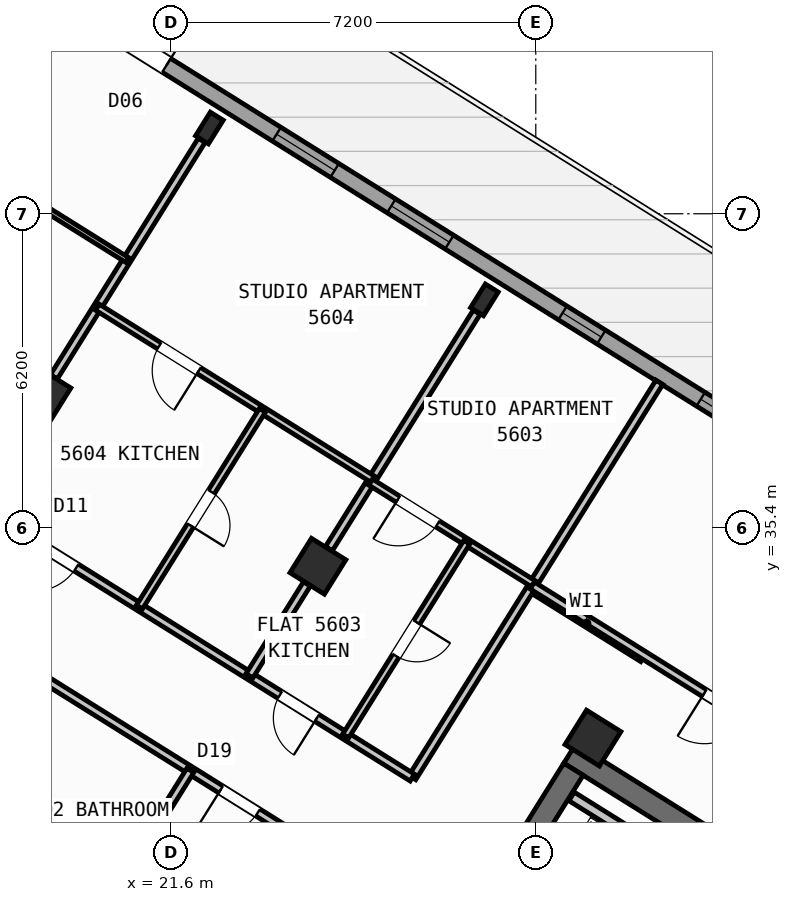
"""IFC4 building model, lengths in metres.
Left out: names, types, materials, properties, quantities, classifications, styles, units other than length and angle.
Written with IfcOpenShell. Run it as: python <this file> out.ifc"""

import sys

from ifc_helpers import new_model, si_unit, direction, frame, frame_2d, origin, origin_2d, place, context, subcontext, project, spatial, rectangle, hollow_rectangle, i_section, extrude, source, transform, mapped, element, fill, save


model = new_model("IFC4")
c1 = context("Model", 3, precision=1e-05, world=origin(), true_north=direction((0.0, 1.0)))
c2 = subcontext(c1, "Body", "Model", "MODEL_VIEW")
j1 = project(units=[si_unit("LENGTHUNIT", "METRE"), si_unit("PLANEANGLEUNIT", "RADIAN")], contexts=[c1])
p1 = place(None, origin())
s1 = spatial("IfcSite", under=j1, at=p1, CompositionType="ELEMENT")
p2 = place(p1, origin())
s2 = spatial("IfcBuilding", under=s1, at=p2, CompositionType="ELEMENT")
p3 = place(p2, frame((0.0, 0.0, 222.0)))
s3 = spatial("IfcBuildingStorey", under=s2, at=p3, CompositionType="ELEMENT", Elevation=222.0)
p4 = place(p3, frame((40.531, 24.036, 0.0), z_axis=(0.0, 0.0, 1.0), x_axis=(-0.848048787466, 0.529918157905, 0.0)))
e1 = element("IfcWall", 1, at=p4, inside=s3, PredefinedType="SHEAR", context=c2, shape_type="SweptSolid", body=[
    extrude(rectangle(XDim=13.04, YDim=0.45, at=frame_2d((6.52, 0.0))), origin(), (0.0, 0.0, 1.0), 3.35),
])
p5 = place(p3, frame((29.544, 30.636, 0.0), z_axis=(0.0, 0.0, 1.0), x_axis=(-0.529902075036, -0.848058836916, 0.0)))
e2 = element("IfcWall", 2, at=p5, inside=s3, PredefinedType="SHEAR", context=c2, shape_type="SweptSolid", body=[
    extrude(rectangle(XDim=3.625, YDim=0.45, at=frame_2d((1.812, 0.0))), origin(), (0.0, 0.0, 1.0), 3.35),
])
m1 = source(origin(), c2, "Body", "SweptSolid", [
    extrude(hollow_rectangle(XDim=0.8, YDim=0.8, WallThickness=0.032, at=origin_2d()), origin(), (0.0, 0.0, 1.0), 3.6),
])
p6 = place(p3, frame((29.928, 31.251, 0.0), z_axis=(0.0, 0.0, 1.0), x_axis=(-0.848048096156, 0.529919264233, 0.0)))
e3 = element("IfcColumn", 3, at=p6, inside=s3, PredefinedType="COLUMN", context=c2, shape_type="MappedRepresentation", body=[
    mapped(m1, transform((0.0, 0.0, 0.0), scale=1.0)),
])
m2 = source(origin(), c2, "Body", "SweptSolid", [
    extrude(i_section(OverallWidth=0.3, OverallDepth=0.55, WebThickness=0.015, FlangeThickness=0.029, at=origin_2d()), origin(), (0.0, 0.0, 1.0), 3.6),
])
p7 = place(p3, frame((27.786, 39.901, 0.0), z_axis=(0.0, 0.0, 1.0), x_axis=(-0.848048096156, 0.529919264233, 0.0)))
e4 = element("IfcColumn", 4, at=p7, inside=s3, PredefinedType="COLUMN", context=c2, shape_type="MappedRepresentation", body=[
    mapped(m2, transform((0.0, 0.0, 0.0), scale=1.0)),
])
p8 = place(p3, frame((24.5, 34.643, 0.0), z_axis=(0.0, 0.0, 1.0), x_axis=(-0.848048096156, 0.529919264233, 0.0)))
e5 = element("IfcColumn", 5, at=p8, inside=s3, PredefinedType="COLUMN", context=c2, shape_type="MappedRepresentation", body=[
    mapped(m1, transform((0.0, 0.0, 0.0), scale=1.0)),
])
p9 = place(p3, frame((22.358, 43.292, 0.0), z_axis=(0.0, 0.0, 1.0), x_axis=(-0.848048096156, 0.529919264233, 0.0)))
e6 = element("IfcColumn", 6, at=p9, inside=s3, PredefinedType="COLUMN", context=c2, shape_type="MappedRepresentation", body=[
    mapped(m2, transform((0.0, 0.0, 0.0), scale=1.0)),
])
p10 = place(p3, frame((19.073, 38.034, 0.0), z_axis=(0.0, 0.0, 1.0), x_axis=(-0.848048096156, 0.529919264233, 0.0)))
e7 = element("IfcColumn", 7, at=p10, inside=s3, PredefinedType="COLUMN", context=c2, shape_type="MappedRepresentation", body=[
    mapped(m1, transform((0.0, 0.0, 0.0), scale=1.0)),
])
p11 = place(p3, frame((17.424, 47.083, 0.0), z_axis=(0.0, 0.0, 1.0), x_axis=(0.848049927979, -0.529916332693, 0.0)))
e8 = element("IfcWall", 8, at=p11, inside=s3, PredefinedType="STANDARD", context=c2, shape_type="SweptSolid", body=[
    extrude(rectangle(XDim=29.223, YDim=0.32, at=frame_2d((14.612, 0.0))), origin(), (0.0, 0.0, 1.0), 3.35),
])
p12 = place(p11, frame((3.77, 0.0, 0.0)))
e9 = element("IfcOpeningElement", 9, at=p12, cuts=e8, PredefinedType="OPENING", context=c2, shape_type="SweptSolid", body=[
    extrude(rectangle(XDim=1.05, YDim=2.15, at=frame_2d((0.525, 1.075))), frame((0.0, 0.17, 0.0), z_axis=(0.0, -1.0, 0.0), x_axis=(1.0, 0.0, 0.0)), (0.0, 0.0, 1.0), 0.34),
])
p13 = place(p11, frame((1.125, 0.0, 0.9)))
e10 = element("IfcOpeningElement", 10, at=p13, cuts=e8, PredefinedType="OPENING", context=c2, shape_type="SweptSolid", body=[
    extrude(rectangle(XDim=1.65, YDim=1.45, at=frame_2d((0.825, 0.725))), frame((0.0, 0.17, 0.0), z_axis=(0.0, -1.0, 0.0), x_axis=(1.0, 0.0, 0.0)), (0.0, 0.0, 1.0), 0.34),
])
p14 = place(p11, frame((7.384, 0.0, 0.9)))
e11 = element("IfcOpeningElement", 11, at=p14, cuts=e8, PredefinedType="OPENING", context=c2, shape_type="SweptSolid", body=[
    extrude(rectangle(XDim=1.35, YDim=1.45, at=frame_2d((0.675, 0.725))), frame((0.0, 0.17, 0.0), z_axis=(0.0, -1.0, 0.0), x_axis=(1.0, 0.0, 0.0)), (0.0, 0.0, 1.0), 0.34),
])
p15 = place(p11, frame((10.054, 0.0, 0.9)))
e12 = element("IfcOpeningElement", 12, at=p15, cuts=e8, PredefinedType="OPENING", context=c2, shape_type="SweptSolid", body=[
    extrude(rectangle(XDim=1.35, YDim=1.45, at=frame_2d((0.675, 0.725))), frame((0.0, 0.17, 0.0), z_axis=(0.0, -1.0, 0.0), x_axis=(1.0, 0.0, 0.0)), (0.0, 0.0, 1.0), 0.34),
])
p16 = place(p11, frame((14.039, 0.0, 1.0)))
e13 = element("IfcOpeningElement", 13, at=p16, cuts=e8, PredefinedType="OPENING", context=c2, shape_type="SweptSolid", body=[
    extrude(rectangle(XDim=0.9, YDim=1.25, at=frame_2d((0.45, 0.625))), frame((0.0, 0.17, 0.0), z_axis=(0.0, -1.0, 0.0), x_axis=(1.0, 0.0, 0.0)), (0.0, 0.0, 1.0), 0.34),
])
p17 = place(p11, frame((17.254, 0.0, 1.0)))
e14 = element("IfcOpeningElement", 14, at=p17, cuts=e8, PredefinedType="OPENING", context=c2, shape_type="SweptSolid", body=[
    extrude(rectangle(XDim=0.9, YDim=1.25, at=frame_2d((0.45, 0.625))), frame((0.0, 0.17, 0.0), z_axis=(0.0, -1.0, 0.0), x_axis=(1.0, 0.0, 0.0)), (0.0, 0.0, 1.0), 0.34),
])
p18 = place(p11, frame((20.161, 0.0, 0.9)))
e15 = element("IfcOpeningElement", 15, at=p18, cuts=e8, PredefinedType="OPENING", context=c2, shape_type="SweptSolid", body=[
    extrude(rectangle(XDim=1.35, YDim=1.45, at=frame_2d((0.675, 0.725))), frame((0.0, 0.17, 0.0), z_axis=(0.0, -1.0, 0.0), x_axis=(1.0, 0.0, 0.0)), (0.0, 0.0, 1.0), 0.34),
])
p19 = place(p11, frame((22.846, 0.0, 0.9)))
e16 = element("IfcOpeningElement", 16, at=p19, cuts=e8, PredefinedType="OPENING", context=c2, shape_type="SweptSolid", body=[
    extrude(rectangle(XDim=1.35, YDim=1.45, at=frame_2d((0.675, 0.725))), frame((0.0, 0.17, 0.0), z_axis=(0.0, -1.0, 0.0), x_axis=(1.0, 0.0, 0.0)), (0.0, 0.0, 1.0), 0.34),
])
p20 = place(p11, frame((26.898, 0.0, 1.0)))
e17 = element("IfcOpeningElement", 17, at=p20, cuts=e8, PredefinedType="OPENING", context=c2, shape_type="SweptSolid", body=[
    extrude(rectangle(XDim=0.9, YDim=1.25, at=frame_2d((0.45, 0.625))), frame((0.0, 0.17, 0.0), z_axis=(0.0, -1.0, 0.0), x_axis=(1.0, 0.0, 0.0)), (0.0, 0.0, 1.0), 0.34),
])
p21 = place(p3, frame((33.363, 27.69, 0.0), z_axis=(0.0, 0.0, 1.0), x_axis=(-0.84804957148, 0.529916903215, 0.0)))
e18 = element("IfcWall", 18, at=p21, inside=s3, PredefinedType="STANDARD", context=c2, shape_type="SweptSolid", body=[
    extrude(rectangle(XDim=4.548, YDim=0.2, at=frame_2d((2.274, 0.0))), origin(), (0.0, 0.0, 1.0), 3.34),
])
p22 = place(p3, frame((30.914, 32.829, 0.0), z_axis=(0.0, 0.0, 1.0), x_axis=(-0.848008813643, 0.529982124211, 0.0)))
e19 = element("IfcWall", 19, at=p22, inside=s3, PredefinedType="PARTITIONING", context=c2, shape_type="SweptSolid", body=[
    extrude(rectangle(XDim=2.61, YDim=0.16, at=frame_2d((1.305, 0.0))), origin(), (0.0, 0.0, 1.0), 3.34),
])
p23 = place(p3, frame((31.239, 38.274, 0.0), z_axis=(0.0, 0.0, 1.0), x_axis=(-0.529920220799, -0.848047498427, 0.0)))
e20 = element("IfcWall", 20, at=p23, inside=s3, PredefinedType="PARTITIONING", context=c2, shape_type="SweptSolid", body=[
    extrude(rectangle(XDim=9.2, YDim=0.16, at=frame_2d((4.6, 0.0))), origin(), (0.0, 0.0, 1.0), 3.34),
])
p24 = place(p3, frame((26.363, 30.472, 0.0), z_axis=(0.0, 0.0, 1.0), x_axis=(-0.848052408131, 0.529912363569, 0.0)))
e21 = element("IfcWall", 21, at=p24, inside=s3, PredefinedType="PARTITIONING", context=c2, shape_type="SweptSolid", body=[
    extrude(rectangle(XDim=16.73, YDim=0.16, at=frame_2d((8.365, 0.0))), origin(), (0.0, 0.0, 1.0), 3.34),
])
p25 = place(p24, frame((2.22, 0.0, 0.0)))
e22 = element("IfcOpeningElement", 22, at=p25, cuts=e21, PredefinedType="OPENING", context=c2, shape_type="SweptSolid", body=[
    extrude(rectangle(XDim=0.86, YDim=2.05, at=frame_2d((0.43, 1.025))), frame((0.0, 0.09, 0.0), z_axis=(0.0, -1.0, 0.0), x_axis=(1.0, 0.0, 0.0)), (0.0, 0.0, 1.0), 0.18),
])
p26 = place(p24, frame((7.82, 0.0, 0.0)))
e23 = element("IfcOpeningElement", 23, at=p26, cuts=e21, PredefinedType="OPENING", context=c2, shape_type="SweptSolid", body=[
    extrude(rectangle(XDim=1.0, YDim=2.1, at=frame_2d((0.5, 1.05))), frame((0.0, 0.09, 0.0), z_axis=(0.0, -1.0, 0.0), x_axis=(1.0, 0.0, 0.0)), (0.0, 0.0, 1.0), 0.18),
])
p27 = place(p24, frame((12.95, 0.0, 0.0)))
e24 = element("IfcOpeningElement", 24, at=p27, cuts=e21, PredefinedType="OPENING", context=c2, shape_type="SweptSolid", body=[
    extrude(rectangle(XDim=1.0, YDim=2.1, at=frame_2d((0.5, 1.05))), frame((0.0, 0.09, 0.0), z_axis=(0.0, -1.0, 0.0), x_axis=(1.0, 0.0, 0.0)), (0.0, 0.0, 1.0), 0.18),
])
p28 = place(p3, frame((25.198, 28.606, 0.0), z_axis=(0.0, 0.0, 1.0), x_axis=(-0.848052408131, 0.529912363569, 0.0)))
e25 = element("IfcWall", 25, at=p28, inside=s3, PredefinedType="PARTITIONING", context=c2, shape_type="SweptSolid", body=[
    extrude(rectangle(XDim=16.73, YDim=0.16, at=frame_2d((8.365, 0.0))), origin(), (0.0, 0.0, 1.0), 3.34),
])
p29 = place(p28, frame((2.22, 0.0, 0.0)))
e26 = element("IfcOpeningElement", 26, at=p29, cuts=e25, PredefinedType="OPENING", context=c2, shape_type="SweptSolid", body=[
    extrude(rectangle(XDim=0.86, YDim=2.05, at=frame_2d((0.43, 1.025))), frame((0.0, 0.09, 0.0), z_axis=(0.0, -1.0, 0.0), x_axis=(1.0, 0.0, 0.0)), (0.0, 0.0, 1.0), 0.18),
])
p30 = place(p28, frame((12.084, 0.0, 0.0)))
e27 = element("IfcOpeningElement", 27, at=p30, cuts=e25, PredefinedType="OPENING", context=c2, shape_type="SweptSolid", body=[
    extrude(rectangle(XDim=1.0, YDim=2.1, at=frame_2d((0.5, 1.05))), frame((0.0, 0.09, 0.0), z_axis=(0.0, -1.0, 0.0), x_axis=(1.0, 0.0, 0.0)), (0.0, 0.0, 1.0), 0.18),
])
p31 = place(p3, frame((21.983, 30.615, 0.0), z_axis=(0.0, 0.0, 1.0), x_axis=(-0.529978410432, -0.848011134641, 0.0)))
e28 = element("IfcWall", 28, at=p31, inside=s3, PredefinedType="PARTITIONING", context=c2, shape_type="SweptSolid", body=[
    extrude(rectangle(XDim=2.138, YDim=0.16, at=frame_2d((1.069, 0.0))), origin(), (0.0, 0.0, 1.0), 2.825),
])
p32 = place(p3, frame((19.556, 26.73, 0.0), z_axis=(0.0, 0.0, 1.0), x_axis=(-0.848043949058, 0.52992590092, 0.0)))
e29 = element("IfcWall", 29, at=p32, inside=s3, PredefinedType="PLUMBINGWALL", context=c2, shape_type="SweptSolid", body=[
    extrude(rectangle(XDim=12.92, YDim=0.14, at=frame_2d((6.46, 0.0))), origin(), (0.0, 0.0, 1.0), 3.34),
])
p33 = place(p32, frame((5.849, 0.0, 0.0)))
e30 = element("IfcOpeningElement", 30, at=p33, cuts=e29, PredefinedType="OPENING", context=c2, shape_type="SweptSolid", body=[
    extrude(rectangle(XDim=0.92, YDim=2.08, at=frame_2d((0.46, 1.04))), frame((0.0, 0.08, 0.0), z_axis=(0.0, -1.0, 0.0), x_axis=(1.0, 0.0, 0.0)), (0.0, 0.0, 1.0), 0.16),
])
p34 = place(p3, frame((27.634, 39.657, 0.0), z_axis=(0.0, 0.0, 1.0), x_axis=(-0.529899205623, -0.848060629837, 0.0)))
e31 = element("IfcWall", 31, at=p34, inside=s3, PredefinedType="PARTITIONING", context=c2, shape_type="SweptSolid", body=[
    extrude(rectangle(XDim=5.501, YDim=0.16, at=frame_2d((2.75, 0.0))), origin(), (0.0, 0.0, 1.0), 2.825),
])
p35 = place(p3, frame((24.282, 34.293, 0.0), z_axis=(0.0, 0.0, 1.0), x_axis=(-0.529927092104, -0.84804320471, 0.0)))
e32 = element("IfcWall", 32, at=p35, inside=s3, PredefinedType="PARTITIONING", context=c2, shape_type="SweptSolid", body=[
    extrude(rectangle(XDim=2.138, YDim=0.16, at=frame_2d((1.069, 0.0))), origin(), (0.0, 0.0, 1.0), 2.825),
])
p36 = place(p3, frame((28.753, 34.297, 0.0), z_axis=(0.0, 0.0, 1.0), x_axis=(-0.848059820872, 0.529900500304, 0.0)))
e33 = element("IfcWall", 33, at=p36, inside=s3, PredefinedType="PLUMBINGWALL", context=c2, shape_type="SweptSolid", body=[
    extrude(rectangle(XDim=3.79, YDim=0.14, at=frame_2d((1.895, 0.0))), origin(), (0.0, 0.0, 1.0), 3.34),
])
p37 = place(p36, frame((2.23, 0.0, 0.0)))
e34 = element("IfcOpeningElement", 34, at=p37, cuts=e33, PredefinedType="OPENING", context=c2, shape_type="SweptSolid", body=[
    extrude(rectangle(XDim=0.92, YDim=2.08, at=frame_2d((0.46, 1.04))), frame((0.0, 0.08, 0.0), z_axis=(0.0, -1.0, 0.0), x_axis=(1.0, 0.0, 0.0)), (0.0, 0.0, 1.0), 0.16),
])
p38 = place(p3, frame((27.439, 35.118, 0.0), z_axis=(0.0, 0.0, 1.0), x_axis=(-0.529911350634, -0.84805304107, 0.0)))
e35 = element("IfcWall", 35, at=p38, inside=s3, PredefinedType="PLUMBINGWALL", context=c2, shape_type="SweptSolid", body=[
    extrude(rectangle(XDim=4.51, YDim=0.14, at=frame_2d((2.255, 0.0))), origin(), (0.0, 0.0, 1.0), 2.995),
])
p39 = place(p38, frame((1.865, 0.0, 0.0)))
e36 = element("IfcOpeningElement", 36, at=p39, cuts=e35, PredefinedType="OPENING", context=c2, shape_type="SweptSolid", body=[
    extrude(rectangle(XDim=0.78, YDim=2.05, at=frame_2d((0.39, 1.025))), frame((0.0, 0.08, 0.0), z_axis=(0.0, -1.0, 0.0), x_axis=(1.0, 0.0, 0.0)), (0.0, 0.0, 1.0), 0.16),
])
p40 = place(p3, frame((22.206, 43.049, 0.0), z_axis=(0.0, 0.0, 1.0), x_axis=(-0.529919150083, -0.848048167486, 0.0)))
e37 = element("IfcWall", 37, at=p40, inside=s3, PredefinedType="PARTITIONING", context=c2, shape_type="SweptSolid", body=[
    extrude(rectangle(XDim=5.501, YDim=0.16, at=frame_2d((2.75, 0.0))), origin(), (0.0, 0.0, 1.0), 2.825),
])
p41 = place(p3, frame((25.576, 36.365, 0.0), z_axis=(0.0, 0.0, 1.0), x_axis=(-0.848056163074, 0.529906354247, 0.0)))
e38 = element("IfcWall", 38, at=p41, inside=s3, PredefinedType="PLUMBINGWALL", context=c2, shape_type="SweptSolid", body=[
    extrude(rectangle(XDim=6.4, YDim=0.14, at=frame_2d((3.2, 0.0))), origin(), (0.0, 0.0, 1.0), 3.34),
])
p42 = place(p41, frame((4.04, 0.0, 0.0)))
e39 = element("IfcOpeningElement", 39, at=p42, cuts=e38, PredefinedType="OPENING", context=c2, shape_type="SweptSolid", body=[
    extrude(rectangle(XDim=0.92, YDim=2.08, at=frame_2d((0.46, 1.04))), frame((0.0, 0.08, 0.0), z_axis=(0.0, -1.0, 0.0), x_axis=(1.0, 0.0, 0.0)), (0.0, 0.0, 1.0), 0.16),
])
p43 = place(p3, frame((23.405, 37.721, 0.0), z_axis=(0.0, 0.0, 1.0), x_axis=(-0.529955816375, -0.848025254748, 0.0)))
e40 = element("IfcWall", 40, at=p43, inside=s3, PredefinedType="PLUMBINGWALL", context=c2, shape_type="SweptSolid", body=[
    extrude(rectangle(XDim=4.58, YDim=0.14, at=frame_2d((2.29, 0.0))), origin(), (0.0, 0.0, 1.0), 3.34),
])
p44 = place(p43, frame((1.9, 0.0, 0.0)))
e41 = element("IfcOpeningElement", 41, at=p44, cuts=e40, PredefinedType="OPENING", context=c2, shape_type="SweptSolid", body=[
    extrude(rectangle(XDim=0.78, YDim=2.05, at=frame_2d((0.39, 1.025))), frame((0.0, 0.08, 0.0), z_axis=(0.0, -1.0, 0.0), x_axis=(1.0, 0.0, 0.0)), (0.0, 0.0, 1.0), 0.16),
])
p45 = place(p3, frame((20.733, 40.69, 0.0), z_axis=(0.0, 0.0, 1.0), x_axis=(-0.848048787466, 0.529918157905, 0.0)))
e42 = element("IfcWall", 42, at=p45, inside=s3, PredefinedType="PARTITIONING", context=c2, shape_type="SweptSolid", body=[
    extrude(rectangle(XDim=6.52, YDim=0.11, at=frame_2d((3.26, 0.0))), origin(), (0.0, 0.0, 1.0), 3.34),
])
p46 = place(p45, frame((2.8, 0.0, 0.0)))
e43 = element("IfcOpeningElement", 43, at=p46, cuts=e42, PredefinedType="OPENING", context=c2, shape_type="SweptSolid", body=[
    extrude(rectangle(XDim=0.92, YDim=2.08, at=frame_2d((0.46, 1.04))), frame((0.0, 0.065, 0.0), z_axis=(0.0, -1.0, 0.0), x_axis=(1.0, 0.0, 0.0)), (0.0, 0.0, 1.0), 0.13),
])
p47 = place(p3, frame((41.936, 26.012, 0.0), z_axis=(0.0, 0.0, 1.0), x_axis=(-0.848051154596, 0.529914369676, 0.0)))
e44 = element("IfcWall", 44, at=p47, inside=s3, PredefinedType="PARTITIONING", context=c2, shape_type="SweptSolid", body=[
    extrude(rectangle(XDim=15.57, YDim=0.16, at=frame_2d((7.785, 0.0))), origin(), (0.0, 0.0, 1.0), 3.34),
])
p48 = place(p47, frame((3.415, 0.0, 0.0)))
e45 = element("IfcOpeningElement", 45, at=p48, cuts=e44, PredefinedType="OPENING", context=c2, shape_type="SweptSolid", body=[
    extrude(rectangle(XDim=1.0, YDim=2.1, at=frame_2d((0.5, 1.05))), frame((0.0, 0.09, 0.0), z_axis=(0.0, -1.0, 0.0), x_axis=(1.0, 0.0, 0.0)), (0.0, 0.0, 1.0), 0.18),
])
p49 = place(p47, frame((10.565, 0.0, 0.0)))
e46 = element("IfcOpeningElement", 46, at=p49, cuts=e44, PredefinedType="OPENING", context=c2, shape_type="SweptSolid", body=[
    extrude(rectangle(XDim=1.0, YDim=2.1, at=frame_2d((0.5, 1.05))), frame((0.0, 0.09, 0.0), z_axis=(0.0, -1.0, 0.0), x_axis=(1.0, 0.0, 0.0)), (0.0, 0.0, 1.0), 0.18),
])
m3 = source(origin(), c2, "Body", "SweptSolid", [
    extrude(rectangle(XDim=1.05, YDim=2.15, at=frame_2d((0.525, 1.075))), frame((0.0, 0.025, 0.0), z_axis=(0.0, -1.0, 0.0), x_axis=(1.0, 0.0, 0.0)), (0.0, 0.0, 1.0), 0.05),
])
p50 = place(p12, origin())
e47 = element("IfcDoor", 47, at=p50, inside=s3, OperationType="SINGLE_SWING_RIGHT", PredefinedType="DOOR", context=c2, shape_type="MappedRepresentation", body=[
    mapped(m3, transform((0.0, 0.0, 0.0), scale=1.0)),
])
fill(e9, e47)
m4 = source(origin(), c2, "Body", "SweptSolid", [
    extrude(rectangle(XDim=1.35, YDim=1.45, at=frame_2d((0.675, 0.725))), frame((0.0, 0.03, 0.0), z_axis=(0.0, -1.0, 0.0), x_axis=(1.0, 0.0, 0.0)), (0.0, 0.0, 1.0), 0.06),
])
p51 = place(p14, origin())
e48 = element("IfcWindow", 48, at=p51, inside=s3, PartitioningType="SINGLE_PANEL", PredefinedType="WINDOW", context=c2, shape_type="MappedRepresentation", body=[
    mapped(m4, transform((0.0, 0.0, 0.0), scale=1.0)),
])
fill(e11, e48)
p52 = place(p15, origin())
e49 = element("IfcWindow", 49, at=p52, inside=s3, PartitioningType="SINGLE_PANEL", PredefinedType="WINDOW", context=c2, shape_type="MappedRepresentation", body=[
    mapped(m4, transform((0.0, 0.0, 0.0), scale=1.0)),
])
fill(e12, e49)
m5 = source(origin(), c2, "Body", "SweptSolid", [
    extrude(rectangle(XDim=0.9, YDim=1.25, at=frame_2d((0.45, 0.625))), frame((0.0, 0.03, 0.0), z_axis=(0.0, -1.0, 0.0), x_axis=(1.0, 0.0, 0.0)), (0.0, 0.0, 1.0), 0.06),
])
p53 = place(p16, origin())
e50 = element("IfcWindow", 50, at=p53, inside=s3, PartitioningType="SINGLE_PANEL", PredefinedType="WINDOW", context=c2, shape_type="MappedRepresentation", body=[
    mapped(m5, transform((0.0, 0.0, 0.0), scale=1.0)),
])
fill(e13, e50)
p54 = place(p17, origin())
e51 = element("IfcWindow", 51, at=p54, inside=s3, PartitioningType="SINGLE_PANEL", PredefinedType="WINDOW", context=c2, shape_type="MappedRepresentation", body=[
    mapped(m5, transform((0.0, 0.0, 0.0), scale=1.0)),
])
fill(e14, e51)
m6 = source(origin(), c2, "Body", "SweptSolid", [
    extrude(rectangle(XDim=0.86, YDim=2.05, at=frame_2d((0.43, 1.025))), frame((0.0, 0.025, 0.0), z_axis=(0.0, -1.0, 0.0), x_axis=(1.0, 0.0, 0.0)), (0.0, 0.0, 1.0), 0.05),
])
p55 = place(p29, origin())
e52 = element("IfcDoor", 52, at=p55, inside=s3, OperationType="SINGLE_SWING_RIGHT", PredefinedType="DOOR", context=c2, shape_type="MappedRepresentation", body=[
    mapped(m6, transform((0.0, 0.0, 0.0), scale=1.0)),
])
fill(e26, e52)
p56 = place(p25, origin())
e53 = element("IfcDoor", 53, at=p56, inside=s3, OperationType="SINGLE_SWING_LEFT", PredefinedType="DOOR", context=c2, shape_type="MappedRepresentation", body=[
    mapped(m6, transform((0.0, 0.0, 0.0), scale=1.0)),
])
fill(e22, e53)
m7 = source(origin(), c2, "Body", "SweptSolid", [
    extrude(rectangle(XDim=0.92, YDim=2.08, at=frame_2d((0.46, 1.04))), frame((0.0, 0.025, 0.0), z_axis=(0.0, -1.0, 0.0), x_axis=(1.0, 0.0, 0.0)), (0.0, 0.0, 1.0), 0.05),
])
p57 = place(p37, origin())
e54 = element("IfcDoor", 54, at=p57, inside=s3, OperationType="SINGLE_SWING_RIGHT", PredefinedType="DOOR", context=c2, shape_type="MappedRepresentation", body=[
    mapped(m7, transform((0.0, 0.0, 0.0), scale=1.0)),
])
fill(e34, e54)
m8 = source(origin(), c2, "Body", "SweptSolid", [
    extrude(rectangle(XDim=0.78, YDim=2.05, at=frame_2d((0.39, 1.025))), frame((0.0, 0.025, 0.0), z_axis=(0.0, -1.0, 0.0), x_axis=(1.0, 0.0, 0.0)), (0.0, 0.0, 1.0), 0.05),
])
p58 = place(p39, origin())
e55 = element("IfcDoor", 55, at=p58, inside=s3, OperationType="SINGLE_SWING_LEFT", PredefinedType="DOOR", context=c2, shape_type="MappedRepresentation", body=[
    mapped(m8, transform((0.0, 0.0, 0.0), scale=1.0)),
])
fill(e36, e55)
m9 = source(origin(), c2, "Body", "SweptSolid", [
    extrude(rectangle(XDim=1.0, YDim=2.1, at=frame_2d((0.5, 1.05))), frame((0.0, 0.025, 0.0), z_axis=(0.0, -1.0, 0.0), x_axis=(1.0, 0.0, 0.0)), (0.0, 0.0, 1.0), 0.05),
])
p59 = place(p26, origin())
e56 = element("IfcDoor", 56, at=p59, inside=s3, OperationType="SINGLE_SWING_RIGHT", PredefinedType="DOOR", context=c2, shape_type="MappedRepresentation", body=[
    mapped(m9, transform((0.0, 0.0, 0.0), scale=1.0)),
])
fill(e23, e56)
p60 = place(p42, origin())
e57 = element("IfcDoor", 57, at=p60, inside=s3, OperationType="SINGLE_SWING_LEFT", PredefinedType="DOOR", context=c2, shape_type="MappedRepresentation", body=[
    mapped(m7, transform((0.0, 0.0, 0.0), scale=1.0)),
])
fill(e39, e57)
p61 = place(p44, origin())
e58 = element("IfcDoor", 58, at=p61, inside=s3, OperationType="SINGLE_SWING_RIGHT", PredefinedType="DOOR", context=c2, shape_type="MappedRepresentation", body=[
    mapped(m8, transform((0.0, 0.0, 0.0), scale=1.0)),
])
fill(e41, e58)
p62 = place(p49, origin())
e59 = element("IfcDoor", 59, at=p62, inside=s3, OperationType="SINGLE_SWING_RIGHT", PredefinedType="DOOR", context=c2, shape_type="MappedRepresentation", body=[
    mapped(m9, transform((0.0, 0.0, 0.0), scale=1.0)),
])
fill(e46, e59)
save(model, sys.argv[1])
